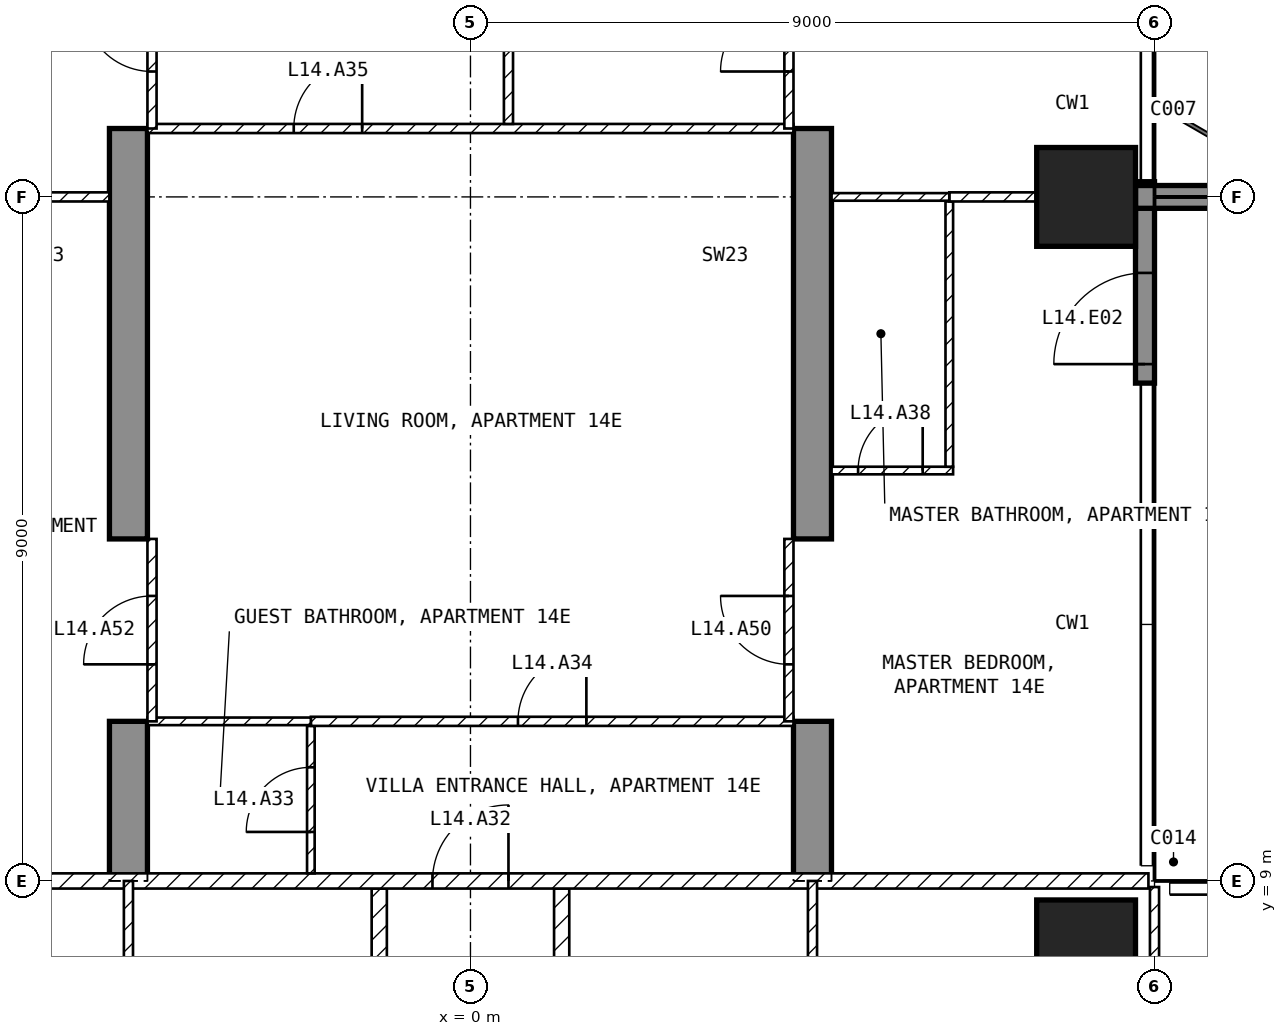
"""IFC4 building model, lengths in metres.
Left out: names, types, materials, properties, quantities, classifications, styles, units other than length and angle.
Written with IfcOpenShell. Run it as: python <this file> out.ifc"""

import sys

from ifc_helpers import new_model, si_unit, direction, frame, frame_2d, origin, origin_2d, place, context, subcontext, project, spatial, polyline, rectangle, outline, extrude, element, fill, save


model = new_model("IFC4")
c1 = context("Model", 3, precision=1e-05, world=origin(), true_north=direction((0.0, 1.0)))
c2 = subcontext(c1, "Body", "Model", "MODEL_VIEW")
j1 = project(units=[si_unit("LENGTHUNIT", "METRE"), si_unit("PLANEANGLEUNIT", "RADIAN")], contexts=[c1])
p1 = place(None, origin())
s1 = spatial("IfcSite", under=j1, at=p1, CompositionType="ELEMENT")
p2 = place(p1, origin())
s2 = spatial("IfcBuilding", under=s1, at=p2, CompositionType="ELEMENT")
p3 = place(p2, frame((0.0, 0.0, 68.0)))
s3 = spatial("IfcBuildingStorey", under=s2, at=p3, CompositionType="ELEMENT", Elevation=68.0)
for number, where, z_axis, x_axis in (
    (1, (8.1, 8.1, -0.25), (0.0, 0.0, 1.0), (1.0, 0.0, 0.0)),
    (2, (8.1, 18.0, -0.25), (0.0, 0.0, 1.0), (1.0, 0.0, 0.0)),
):
    element("IfcColumn", number, at=place(p3, frame(where, z_axis=z_axis, x_axis=x_axis)), inside=s3, PredefinedType="COLUMN", context=c2, shape_type="SweptSolid", body=[
        extrude(rectangle(XDim=1.3, YDim=1.3, at=origin_2d()), origin(), (0.0, 0.0, 1.0), 3.5),
    ])
for number, where, z_axis, x_axis in (
    (3, (-4.75, 9.0, -0.25), (1.0, 0.0, 0.0), (0.0, 1.0, 0.0)),
    (4, (4.25, 9.0, -0.25), (1.0, 0.0, 0.0), (0.0, 1.0, 0.0)),
):
    element("IfcWall", number, at=place(p3, frame(where, z_axis=z_axis, x_axis=x_axis)), inside=s3, PredefinedType="SHEAR", context=c2, shape_type="SweptSolid", body=[
        extrude(outline(polyline([(0.0, 0.0), (2.1, 0.0), (2.1, 2.65), (4.5, 2.65), (4.5, 0.0), (9.9, 0.0), (9.9, 2.65), (12.3, 2.65), (12.3, 0.0), (16.45, 0.0), (16.45, 3.5), (0.0, 3.5), (0.0, 0.0)])), origin(), (0.0, 0.0, 1.0), 0.5),
    ])
p4 = place(p3, frame((8.875, 15.55, 0.0), z_axis=(0.0, 0.0, 1.0), x_axis=(0.0, 1.0, 0.0)))
e5 = element("IfcWall", 5, at=p4, inside=s3, PredefinedType="SOLIDWALL", context=c2, shape_type="SweptSolid", body=[
    extrude(rectangle(XDim=2.65, YDim=0.25, at=frame_2d((1.325, 0.0))), origin(), (0.0, 0.0, 1.0), 3.25),
])
p5 = place(p4, frame((0.25, 0.0, 0.0)))
e6 = element("IfcOpeningElement", 6, at=p5, cuts=e5, PredefinedType="OPENING", context=c2, shape_type="SweptSolid", body=[
    extrude(rectangle(XDim=1.2, YDim=2.4, at=frame_2d((0.6, 1.2))), frame((0.0, 0.135, 0.0), z_axis=(0.0, -1.0, 0.0), x_axis=(1.0, 0.0, 0.0)), (0.0, 0.0, 1.0), 0.27),
])
p6 = place(p3, frame((8.75, 18.0, 0.0), z_axis=(0.0, 0.0, 1.0), x_axis=(1.0, 0.0, 0.0)))
e7 = element("IfcWall", 7, at=p6, inside=s3, PredefinedType="SOLIDWALL", context=c2, shape_type="SweptSolid", body=[
    extrude(rectangle(XDim=2.95, YDim=0.3, at=frame_2d((1.475, 0.0))), origin(), (0.0, 0.0, 1.0), 3.25),
])
for number, where, z_axis, x_axis in (
    (8, (1.2, 8.9, 0.0), (0.0, 0.0, 1.0), (0.0, -1.0, 0.0)),
    (9, (-1.2, 1.3, 0.0), (0.0, 0.0, 1.0), (0.0, 1.0, 0.0)),
):
    element("IfcWall", number, at=place(p3, frame(where, z_axis=z_axis, x_axis=x_axis)), inside=s3, PredefinedType="PARTITIONING", context=c2, shape_type="SweptSolid", body=[
        extrude(rectangle(XDim=7.6, YDim=0.2, at=frame_2d((3.8, 0.0))), origin(), (0.0, 0.0, 1.0), 3.25),
    ])
p7 = place(p3, frame((-8.92, 9.0, 0.0), z_axis=(0.0, 0.0, 1.0), x_axis=(1.0, 0.0, 0.0)))
e10 = element("IfcWall", 10, at=p7, inside=s3, PredefinedType="PARTITIONING", context=c2, shape_type="SweptSolid", body=[
    extrude(rectangle(XDim=17.84, YDim=0.2, at=frame_2d((8.92, 0.0))), origin(), (0.0, 0.0, 1.0), 3.25),
])
p8 = place(p7, frame((8.42, 0.0, 0.0)))
e11 = element("IfcOpeningElement", 11, at=p8, cuts=e10, PredefinedType="OPENING", context=c2, shape_type="SweptSolid", body=[
    extrude(rectangle(XDim=1.0, YDim=2.1, at=frame_2d((0.5, 1.05))), frame((0.0, 0.11, 0.0), z_axis=(0.0, -1.0, 0.0), x_axis=(1.0, 0.0, 0.0)), (0.0, 0.0, 1.0), 0.22),
])
p9 = place(p3, frame((9.0, 3.6, 0.0), z_axis=(0.0, 0.0, 1.0), x_axis=(0.0, 1.0, 0.0)))
e12 = element("IfcWall", 12, at=p9, inside=s3, PredefinedType="PARTITIONING", context=c2, shape_type="SweptSolid", body=[
    extrude(rectangle(XDim=5.32, YDim=0.12, at=frame_2d((2.66, 0.0))), origin(), (0.0, 0.0, 1.0), 3.25),
])
p10 = place(p9, frame((1.75, 0.0, 0.0)))
e13 = element("IfcOpeningElement", 13, at=p10, cuts=e12, PredefinedType="OPENING", context=c2, shape_type="SweptSolid", body=[
    extrude(rectangle(XDim=0.9, YDim=2.1, at=frame_2d((0.45, 1.05))), frame((0.0, 0.07, 0.0), z_axis=(0.0, -1.0, 0.0), x_axis=(1.0, 0.0, 0.0)), (0.0, 0.0, 1.0), 0.14),
])
p11 = place(p3, frame((4.5, 4.32, 0.0), z_axis=(0.0, 0.0, 1.0), x_axis=(0.0, 1.0, 0.0)))
e14 = element("IfcWall", 14, at=p11, inside=s3, PredefinedType="PARTITIONING", context=c2, shape_type="SweptSolid", body=[
    extrude(rectangle(XDim=4.68, YDim=0.12, at=frame_2d((2.34, 0.0))), origin(), (0.0, 0.0, 1.0), 3.25),
])
p12 = place(p11, frame((1.89, 0.0, 0.0)))
e15 = element("IfcOpeningElement", 15, at=p12, cuts=e14, PredefinedType="OPENING", context=c2, shape_type="SweptSolid", body=[
    extrude(rectangle(XDim=0.9, YDim=2.1, at=frame_2d((0.45, 1.05))), frame((0.0, 0.07, 0.0), z_axis=(0.0, -1.0, 0.0), x_axis=(1.0, 0.0, 0.0)), (0.0, 0.0, 1.0), 0.14),
])
p13 = place(p3, frame((-4.5, 9.0, 0.0), z_axis=(0.0, 0.0, 1.0), x_axis=(0.0, -1.0, 0.0)))
e16 = element("IfcWall", 16, at=p13, inside=s3, PredefinedType="PARTITIONING", context=c2, shape_type="SweptSolid", body=[
    extrude(rectangle(XDim=7.7, YDim=0.12, at=frame_2d((3.85, 0.0))), origin(), (0.0, 0.0, 1.0), 3.25),
])
p14 = place(p13, frame((1.812, 0.0, 0.0)))
e17 = element("IfcOpeningElement", 17, at=p14, cuts=e16, PredefinedType="OPENING", context=c2, shape_type="SweptSolid", body=[
    extrude(rectangle(XDim=0.9, YDim=2.1, at=frame_2d((0.45, 1.05))), frame((0.0, 0.07, 0.0), z_axis=(0.0, -1.0, 0.0), x_axis=(1.0, 0.0, 0.0)), (0.0, 0.0, 1.0), 0.14),
])
p15 = place(p3, frame((-2.1, 9.1, 0.0), z_axis=(0.0, 0.0, 1.0), x_axis=(0.0, 1.0, 0.0)))
e18 = element("IfcWall", 18, at=p15, inside=s3, PredefinedType="PARTITIONING", context=c2, shape_type="SweptSolid", body=[
    extrude(rectangle(XDim=1.94, YDim=0.1, at=frame_2d((0.97, 0.0))), origin(), (0.0, 0.0, 1.0), 3.25),
])
p16 = place(p15, frame((0.545, 0.0, 0.0)))
e19 = element("IfcOpeningElement", 19, at=p16, cuts=e18, PredefinedType="OPENING", context=c2, shape_type="SweptSolid", body=[
    extrude(rectangle(XDim=0.85, YDim=2.1, at=frame_2d((0.425, 1.05))), frame((0.0, 0.06, 0.0), z_axis=(0.0, -1.0, 0.0), x_axis=(1.0, 0.0, 0.0)), (0.0, 0.0, 1.0), 0.12),
])
p17 = place(p3, frame((-2.1, 11.1, 0.0), z_axis=(0.0, 0.0, 1.0), x_axis=(1.0, 0.0, 0.0)))
e20 = element("IfcWall", 20, at=p17, inside=s3, PredefinedType="PARTITIONING", context=c2, shape_type="SweptSolid", body=[
    extrude(rectangle(XDim=6.35, YDim=0.12, at=frame_2d((3.175, 0.0))), origin(), (0.0, 0.0, 1.0), 3.25),
])
p18 = place(p17, frame((2.725, 0.0, 0.0)))
e21 = element("IfcOpeningElement", 21, at=p18, cuts=e20, PredefinedType="OPENING", context=c2, shape_type="SweptSolid", body=[
    extrude(rectangle(XDim=0.9, YDim=2.1, at=frame_2d((0.45, 1.05))), frame((0.0, 0.07, 0.0), z_axis=(0.0, -1.0, 0.0), x_axis=(1.0, 0.0, 0.0)), (0.0, 0.0, 1.0), 0.14),
])
p19 = place(p3, frame((-4.25, 11.1, 0.0), z_axis=(0.0, 0.0, 1.0), x_axis=(1.0, 0.0, 0.0)))
e22 = element("IfcWall", 22, at=p19, inside=s3, PredefinedType="PARTITIONING", context=c2, shape_type="SweptSolid", body=[
    extrude(rectangle(XDim=2.15, YDim=0.1, at=frame_2d((1.075, 0.0))), origin(), (0.0, 0.0, 1.0), 3.25),
])
p20 = place(p3, frame((-4.25, 18.9, 0.0), z_axis=(0.0, 0.0, 1.0), x_axis=(1.0, 0.0, 0.0)))
e23 = element("IfcWall", 23, at=p20, inside=s3, PredefinedType="PARTITIONING", context=c2, shape_type="SweptSolid", body=[
    extrude(rectangle(XDim=8.5, YDim=0.12, at=frame_2d((4.25, 0.0))), origin(), (0.0, 0.0, 1.0), 3.25),
])
p21 = place(p20, frame((1.925, 0.0, 0.0)))
e24 = element("IfcOpeningElement", 24, at=p21, cuts=e23, PredefinedType="OPENING", context=c2, shape_type="SweptSolid", body=[
    extrude(rectangle(XDim=0.9, YDim=2.1, at=frame_2d((0.45, 1.05))), frame((0.0, 0.07, 0.0), z_axis=(0.0, -1.0, 0.0), x_axis=(1.0, 0.0, 0.0)), (0.0, 0.0, 1.0), 0.14),
])
p22 = place(p3, frame((0.5, 23.34, 0.0), z_axis=(0.0, 0.0, 1.0), x_axis=(0.0, -1.0, 0.0)))
e25 = element("IfcWall", 25, at=p22, inside=s3, PredefinedType="PARTITIONING", context=c2, shape_type="SweptSolid", body=[
    extrude(rectangle(XDim=4.38, YDim=0.12, at=frame_2d((2.19, 0.0))), origin(), (0.0, 0.0, 1.0), 3.25),
])
p23 = place(p22, frame((1.74, 0.0, 0.0)))
e26 = element("IfcOpeningElement", 26, at=p23, cuts=e25, PredefinedType="OPENING", context=c2, shape_type="SweptSolid", body=[
    extrude(rectangle(XDim=0.9, YDim=2.1, at=frame_2d((0.45, 1.05))), frame((0.0, 0.07, 0.0), z_axis=(0.0, -1.0, 0.0), x_axis=(1.0, 0.0, 0.0)), (0.0, 0.0, 1.0), 0.14),
])
p24 = place(p3, frame((4.75, 14.4, 0.0), z_axis=(0.0, 0.0, 1.0), x_axis=(1.0, 0.0, 0.0)))
e27 = element("IfcWall", 27, at=p24, inside=s3, PredefinedType="PARTITIONING", context=c2, shape_type="SweptSolid", body=[
    extrude(rectangle(XDim=1.6, YDim=0.1, at=frame_2d((0.8, 0.0))), origin(), (0.0, 0.0, 1.0), 3.25),
])
p25 = place(p24, frame((0.35, 0.0, 0.0)))
e28 = element("IfcOpeningElement", 28, at=p25, cuts=e27, PredefinedType="OPENING", context=c2, shape_type="SweptSolid", body=[
    extrude(rectangle(XDim=0.85, YDim=2.1, at=frame_2d((0.425, 1.05))), frame((0.0, 0.06, 0.0), z_axis=(0.0, -1.0, 0.0), x_axis=(1.0, 0.0, 0.0)), (0.0, 0.0, 1.0), 0.12),
])
p26 = place(p3, frame((6.3, 14.45, 0.0), z_axis=(0.0, 0.0, 1.0), x_axis=(0.0, 1.0, 0.0)))
e29 = element("IfcWall", 29, at=p26, inside=s3, PredefinedType="PARTITIONING", context=c2, shape_type="SweptSolid", body=[
    extrude(rectangle(XDim=3.49, YDim=0.1, at=frame_2d((1.745, 0.0))), origin(), (0.0, 0.0, 1.0), 3.25),
])
p27 = place(p3, frame((6.3, 18.0, 0.0), z_axis=(0.0, 0.0, 1.0), x_axis=(1.0, 0.0, 0.0)))
e30 = element("IfcWall", 30, at=p27, inside=s3, PredefinedType="PARTITIONING", context=c2, shape_type="SweptSolid", body=[
    extrude(rectangle(XDim=1.15, YDim=0.12, at=frame_2d((0.575, 0.0))), origin(), (0.0, 0.0, 1.0), 2.346),
])
p28 = place(p3, frame((4.75, 18.0, 0.0), z_axis=(0.0, 0.0, 1.0), x_axis=(1.0, 0.0, 0.0)))
e31 = element("IfcWall", 31, at=p28, inside=s3, PredefinedType="PARTITIONING", context=c2, shape_type="SweptSolid", body=[
    extrude(rectangle(XDim=1.55, YDim=0.1, at=frame_2d((0.775, 0.0))), origin(), (0.0, 0.0, 1.0), 2.346),
])
p29 = place(p3, frame((-7.45, 18.0, 0.0), z_axis=(0.0, 0.0, 1.0), x_axis=(1.0, 0.0, 0.0)))
e32 = element("IfcWall", 32, at=p29, inside=s3, PredefinedType="PARTITIONING", context=c2, shape_type="SweptSolid", body=[
    extrude(rectangle(XDim=2.7, YDim=0.12, at=frame_2d((1.35, 0.0))), origin(), (0.0, 0.0, 1.0), 2.346),
])
p30 = place(p3, frame((4.19, 11.1, 0.0), z_axis=(0.0, 0.0, 1.0), x_axis=(0.0, 1.0, 0.0)))
e33 = element("IfcWall", 33, at=p30, inside=s3, PredefinedType="PARTITIONING", context=c2, shape_type="SweptSolid", body=[
    extrude(rectangle(XDim=2.4, YDim=0.12, at=frame_2d((1.2, 0.0))), origin(), (0.0, 0.0, 1.0), 2.4),
])
p31 = place(p30, frame((0.75, 0.0, 0.0)))
e34 = element("IfcOpeningElement", 34, at=p31, cuts=e33, PredefinedType="OPENING", context=c2, shape_type="SweptSolid", body=[
    extrude(rectangle(XDim=0.9, YDim=2.1, at=frame_2d((0.45, 1.05))), frame((0.0, 0.07, 0.0), z_axis=(0.0, -1.0, 0.0), x_axis=(1.0, 0.0, 0.0)), (0.0, 0.0, 1.0), 0.14),
])
p32 = place(p3, frame((4.19, 18.9, 0.0), z_axis=(0.0, 0.0, 1.0), x_axis=(0.0, 1.0, 0.0)))
e35 = element("IfcWall", 35, at=p32, inside=s3, PredefinedType="PARTITIONING", context=c2, shape_type="SweptSolid", body=[
    extrude(rectangle(XDim=2.4, YDim=0.12, at=frame_2d((1.2, 0.0))), origin(), (0.0, 0.0, 1.0), 2.4),
])
p33 = place(p32, frame((0.75, 0.0, 0.0)))
e36 = element("IfcOpeningElement", 36, at=p33, cuts=e35, PredefinedType="OPENING", context=c2, shape_type="SweptSolid", body=[
    extrude(rectangle(XDim=0.9, YDim=2.1, at=frame_2d((0.45, 1.05))), frame((0.0, 0.07, 0.0), z_axis=(0.0, -1.0, 0.0), x_axis=(1.0, 0.0, 0.0)), (0.0, 0.0, 1.0), 0.14),
])
p34 = place(p3, frame((-4.19, 11.1, 0.0), z_axis=(0.0, 0.0, 1.0), x_axis=(0.0, 1.0, 0.0)))
e37 = element("IfcWall", 37, at=p34, inside=s3, PredefinedType="PARTITIONING", context=c2, shape_type="SweptSolid", body=[
    extrude(rectangle(XDim=2.4, YDim=0.12, at=frame_2d((1.2, 0.0))), origin(), (0.0, 0.0, 1.0), 2.4),
])
p35 = place(p34, frame((0.75, 0.0, 0.0)))
e38 = element("IfcOpeningElement", 38, at=p35, cuts=e37, PredefinedType="OPENING", context=c2, shape_type="SweptSolid", body=[
    extrude(rectangle(XDim=0.9, YDim=2.1, at=frame_2d((0.45, 1.05))), frame((0.0, 0.07, 0.0), z_axis=(0.0, -1.0, 0.0), x_axis=(1.0, 0.0, 0.0)), (0.0, 0.0, 1.0), 0.14),
])
p36 = place(p3, frame((-4.19, 18.9, 0.0), z_axis=(0.0, 0.0, 1.0), x_axis=(0.0, 1.0, 0.0)))
e39 = element("IfcWall", 39, at=p36, inside=s3, PredefinedType="PARTITIONING", context=c2, shape_type="SweptSolid", body=[
    extrude(rectangle(XDim=2.4, YDim=0.12, at=frame_2d((1.2, 0.0))), origin(), (0.0, 0.0, 1.0), 2.4),
])
p37 = place(p36, frame((0.75, 0.0, 0.0)))
e40 = element("IfcOpeningElement", 40, at=p37, cuts=e39, PredefinedType="OPENING", context=c2, shape_type="SweptSolid", body=[
    extrude(rectangle(XDim=0.9, YDim=2.1, at=frame_2d((0.45, 1.05))), frame((0.0, 0.07, 0.0), z_axis=(0.0, -1.0, 0.0), x_axis=(1.0, 0.0, 0.0)), (0.0, 0.0, 1.0), 0.14),
])
p38 = place(p5, origin())
e41 = element("IfcDoor", 41, at=p38, inside=s3, OperationType="SINGLE_SWING_LEFT", PredefinedType="DOOR", context=c2, shape_type="SweptSolid", body=[
    extrude(rectangle(XDim=1.2, YDim=2.4, at=frame_2d((0.6, 1.2))), frame((0.0, 0.025, 0.0), z_axis=(0.0, -1.0, 0.0), x_axis=(1.0, 0.0, 0.0)), (0.0, 0.0, 1.0), 0.05),
])
fill(e6, e41)
p39 = place(p8, origin())
e42 = element("IfcDoor", 42, at=p39, inside=s3, OperationType="SINGLE_SWING_RIGHT", PredefinedType="DOOR", context=c2, shape_type="SweptSolid", body=[
    extrude(rectangle(XDim=1.0, YDim=2.1, at=frame_2d((0.5, 1.05))), frame((0.0, 0.025, 0.0), z_axis=(0.0, -1.0, 0.0), x_axis=(1.0, 0.0, 0.0)), (0.0, 0.0, 1.0), 0.05),
])
fill(e11, e42)
p40 = place(p16, origin())
e43 = element("IfcDoor", 43, at=p40, inside=s3, OperationType="SINGLE_SWING_LEFT", PredefinedType="DOOR", context=c2, shape_type="SweptSolid", body=[
    extrude(rectangle(XDim=0.85, YDim=2.1, at=frame_2d((0.425, 1.05))), frame((0.0, 0.025, 0.0), z_axis=(0.0, -1.0, 0.0), x_axis=(1.0, 0.0, 0.0)), (0.0, 0.0, 1.0), 0.05),
])
fill(e19, e43)
p41 = place(p18, origin())
e44 = element("IfcDoor", 44, at=p41, inside=s3, OperationType="SINGLE_SWING_RIGHT", PredefinedType="DOOR", context=c2, shape_type="SweptSolid", body=[
    extrude(rectangle(XDim=0.9, YDim=2.1, at=frame_2d((0.45, 1.05))), frame((0.0, 0.025, 0.0), z_axis=(0.0, -1.0, 0.0), x_axis=(1.0, 0.0, 0.0)), (0.0, 0.0, 1.0), 0.05),
])
fill(e21, e44)
p42 = place(p21, origin())
e45 = element("IfcDoor", 45, at=p42, inside=s3, OperationType="SINGLE_SWING_RIGHT", PredefinedType="DOOR", context=c2, shape_type="SweptSolid", body=[
    extrude(rectangle(XDim=0.9, YDim=2.1, at=frame_2d((0.45, 1.05))), frame((0.0, 0.025, 0.0), z_axis=(0.0, -1.0, 0.0), x_axis=(1.0, 0.0, 0.0)), (0.0, 0.0, 1.0), 0.05),
])
fill(e24, e45)
p43 = place(p25, origin())
e46 = element("IfcDoor", 46, at=p43, inside=s3, OperationType="SINGLE_SWING_RIGHT", PredefinedType="DOOR", context=c2, shape_type="SweptSolid", body=[
    extrude(rectangle(XDim=0.85, YDim=2.1, at=frame_2d((0.425, 1.05))), frame((0.0, 0.025, 0.0), z_axis=(0.0, -1.0, 0.0), x_axis=(1.0, 0.0, 0.0)), (0.0, 0.0, 1.0), 0.05),
])
fill(e28, e46)
p44 = place(p31, origin())
e47 = element("IfcDoor", 47, at=p44, inside=s3, OperationType="SINGLE_SWING_RIGHT", PredefinedType="DOOR", context=c2, shape_type="SweptSolid", body=[
    extrude(rectangle(XDim=0.9, YDim=2.1, at=frame_2d((0.45, 1.05))), frame((0.0, 0.025, 0.0), z_axis=(0.0, -1.0, 0.0), x_axis=(1.0, 0.0, 0.0)), (0.0, 0.0, 1.0), 0.05),
])
fill(e34, e47)
p45 = place(p33, origin())
e48 = element("IfcDoor", 48, at=p45, inside=s3, OperationType="SINGLE_SWING_LEFT", PredefinedType="DOOR", context=c2, shape_type="SweptSolid", body=[
    extrude(rectangle(XDim=0.9, YDim=2.1, at=frame_2d((0.45, 1.05))), frame((0.0, 0.025, 0.0), z_axis=(0.0, -1.0, 0.0), x_axis=(1.0, 0.0, 0.0)), (0.0, 0.0, 1.0), 0.05),
])
fill(e36, e48)
p46 = place(p35, origin())
e49 = element("IfcDoor", 49, at=p46, inside=s3, OperationType="SINGLE_SWING_LEFT", PredefinedType="DOOR", context=c2, shape_type="SweptSolid", body=[
    extrude(rectangle(XDim=0.9, YDim=2.1, at=frame_2d((0.45, 1.05))), frame((0.0, 0.025, 0.0), z_axis=(0.0, -1.0, 0.0), x_axis=(1.0, 0.0, 0.0)), (0.0, 0.0, 1.0), 0.05),
])
fill(e38, e49)
p47 = place(p37, origin())
e50 = element("IfcDoor", 50, at=p47, inside=s3, OperationType="SINGLE_SWING_RIGHT", PredefinedType="DOOR", context=c2, shape_type="SweptSolid", body=[
    extrude(rectangle(XDim=0.9, YDim=2.1, at=frame_2d((0.45, 1.05))), frame((0.0, 0.025, 0.0), z_axis=(0.0, -1.0, 0.0), x_axis=(1.0, 0.0, 0.0)), (0.0, 0.0, 1.0), 0.05),
])
fill(e40, e50)
save(model, sys.argv[1])
